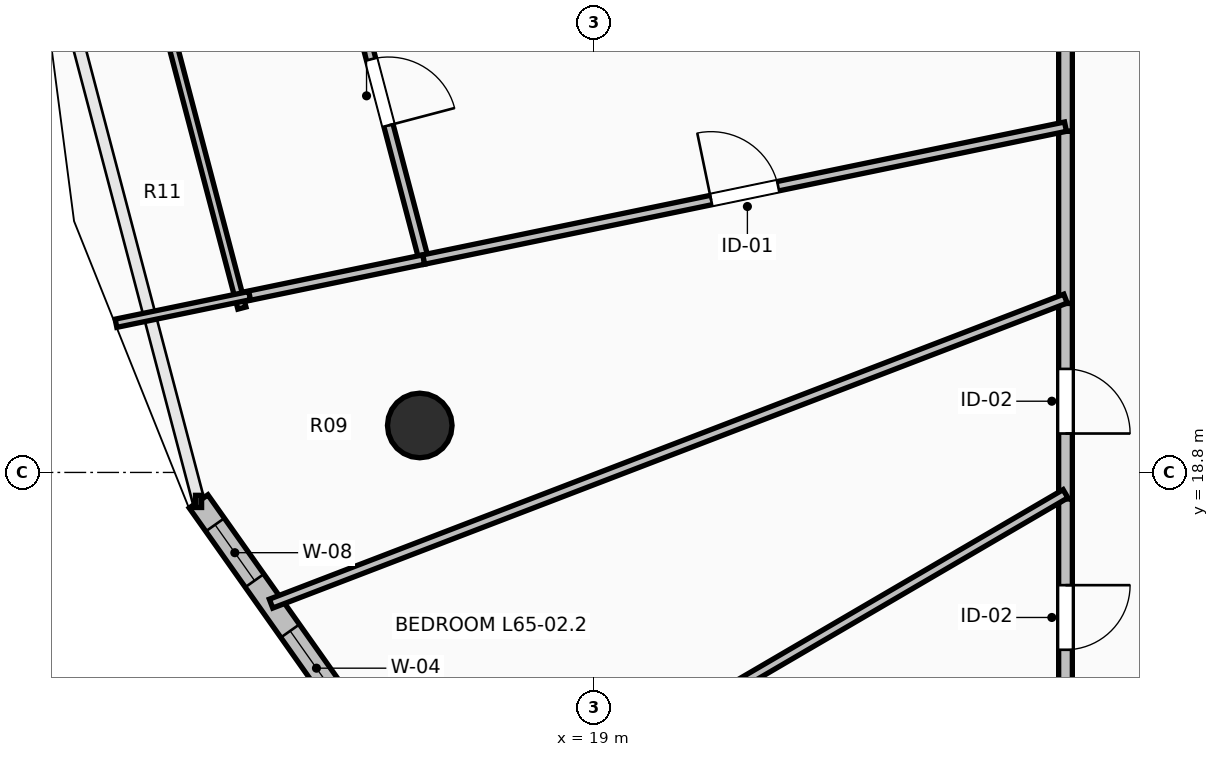
"""IFC4 building model, lengths in metres.
Left out: names, types, materials, properties, quantities, classifications, styles, units other than length and angle.
Written with IfcOpenShell. Run it as: python <this file> out.ifc"""

import sys

from ifc_helpers import new_model, si_unit, direction, frame, frame_2d, origin, origin_2d, place, context, subcontext, project, spatial, rectangle, circle, extrude, element, fill, save


model = new_model("IFC4")
c1 = context("Model", 3, precision=1e-05, world=origin(), true_north=direction((0.0, 1.0)))
c2 = subcontext(c1, "Body", "Model", "MODEL_VIEW")
j1 = project(units=[si_unit("LENGTHUNIT", "METRE"), si_unit("PLANEANGLEUNIT", "RADIAN")], contexts=[c1])
p1 = place(None, origin())
s1 = spatial("IfcSite", under=j1, at=p1, CompositionType="ELEMENT")
p2 = place(p1, origin())
s2 = spatial("IfcBuilding", under=s1, at=p2, CompositionType="ELEMENT")
p3 = place(p2, frame((0.0, 0.0, 241.35)))
s3 = spatial("IfcBuildingStorey", under=s2, at=p3, CompositionType="ELEMENT", Elevation=241.35)
p4 = place(p3, frame((16.705, 19.418, 0.0), z_axis=(0.0, 0.0, 1.0), x_axis=(-0.923879532511, -0.382683432365, 0.0)))
e1 = element("IfcColumn", 1, at=p4, inside=s3, PredefinedType="COLUMN", context=c2, shape_type="SweptSolid", body=[
    extrude(circle(Radius=0.425, at=origin_2d()), origin(), (0.0, 0.0, 1.0), 3.55),
])
p5 = place(p3, frame((13.794, 18.419, 0.0), z_axis=(0.0, 0.0, 1.0), x_axis=(0.577261247247, -0.816559521668, 0.0)))
e2 = element("IfcWall", 2, at=p5, inside=s3, PredefinedType="STANDARD", context=c2, shape_type="SweptSolid", body=[
    extrude(rectangle(XDim=4.194, YDim=0.3, at=frame_2d((2.097, 0.0))), origin(), (0.0, 0.0, 1.0), 3.29),
])
p6 = place(p5, frame((0.376, 0.0, 0.85)))
e3 = element("IfcOpeningElement", 3, at=p6, cuts=e2, PredefinedType="OPENING", context=c2, shape_type="SweptSolid", body=[
    extrude(rectangle(XDim=0.9, YDim=1.8, at=frame_2d((0.45, 0.9))), frame((0.0, 0.165, 0.0), z_axis=(0.0, -1.0, 0.0), x_axis=(1.0, 0.0, 0.0)), (0.0, 0.0, 1.0), 0.33),
])
p7 = place(p5, frame((2.087, 0.0, 0.85)))
e4 = element("IfcOpeningElement", 4, at=p7, cuts=e2, PredefinedType="OPENING", context=c2, shape_type="SweptSolid", body=[
    extrude(rectangle(XDim=1.2, YDim=1.95, at=frame_2d((0.6, 0.975))), frame((0.0, 0.165, 0.0), z_axis=(0.0, -1.0, 0.0), x_axis=(1.0, 0.0, 0.0)), (0.0, 0.0, 1.0), 0.33),
])
p8 = place(p3, frame((25.2, 27.735, 0.0), z_axis=(0.0, 0.0, 1.0), x_axis=(0.0, -1.0, 0.0)))
e5 = element("IfcWall", 5, at=p8, inside=s3, PredefinedType="PARTITIONING", context=c2, shape_type="SweptSolid", body=[
    extrude(rectangle(XDim=4.447, YDim=0.18, at=frame_2d((2.224, 0.0))), origin(), (0.0, 0.0, 1.0), 2.482),
])
p9 = place(p8, frame((1.723, 0.0, 0.0)))
e6 = element("IfcOpeningElement", 6, at=p9, cuts=e5, PredefinedType="OPENING", context=c2, shape_type="SweptSolid", body=[
    extrude(rectangle(XDim=1.0, YDim=2.15, at=frame_2d((0.5, 1.075))), frame((0.0, 0.105, 0.0), z_axis=(0.0, -1.0, 0.0), x_axis=(1.0, 0.0, 0.0)), (0.0, 0.0, 1.0), 0.21),
])
p10 = place(p3, frame((25.2, 23.288, 0.0), z_axis=(0.0, 0.0, 1.0), x_axis=(0.0, -1.0, 0.0)))
e7 = element("IfcWall", 7, at=p10, inside=s3, PredefinedType="PARTITIONING", context=c2, shape_type="SweptSolid", body=[
    extrude(rectangle(XDim=2.265, YDim=0.18, at=frame_2d((1.133, 0.0))), origin(), (0.0, 0.0, 1.0), 3.29),
])
p11 = place(p3, frame((25.2, 21.023, 0.0), z_axis=(0.0, 0.0, 1.0), x_axis=(0.0, -1.0, 0.0)))
e8 = element("IfcWall", 8, at=p11, inside=s3, PredefinedType="PARTITIONING", context=c2, shape_type="SweptSolid", body=[
    extrude(rectangle(XDim=2.572, YDim=0.18, at=frame_2d((1.286, 0.0))), origin(), (0.0, 0.0, 1.0), 3.29),
])
p12 = place(p11, frame((0.861, 0.0, 0.0)))
e9 = element("IfcOpeningElement", 9, at=p12, cuts=e8, PredefinedType="OPENING", context=c2, shape_type="SweptSolid", body=[
    extrude(rectangle(XDim=0.85, YDim=2.1, at=frame_2d((0.425, 1.05))), frame((0.0, 0.105, 0.0), z_axis=(0.0, -1.0, 0.0), x_axis=(1.0, 0.0, 0.0)), (0.0, 0.0, 1.0), 0.21),
])
p13 = place(p3, frame((25.2, 18.451, 0.0), z_axis=(0.0, 0.0, 1.0), x_axis=(0.0, -1.0, 0.0)))
e10 = element("IfcWall", 10, at=p13, inside=s3, PredefinedType="PARTITIONING", context=c2, shape_type="SweptSolid", body=[
    extrude(rectangle(XDim=3.118, YDim=0.18, at=frame_2d((1.559, 0.0))), origin(), (0.0, 0.0, 1.0), 2.482),
])
p14 = place(p13, frame((1.134, 0.0, 0.0)))
e11 = element("IfcOpeningElement", 11, at=p14, cuts=e10, PredefinedType="OPENING", context=c2, shape_type="SweptSolid", body=[
    extrude(rectangle(XDim=0.85, YDim=2.1, at=frame_2d((0.425, 1.05))), frame((0.0, 0.105, 0.0), z_axis=(0.0, -1.0, 0.0), x_axis=(1.0, 0.0, 0.0)), (0.0, 0.0, 1.0), 0.21),
])
p15 = place(p3, frame((15.6, 26.0, 0.0), z_axis=(0.0, 0.0, 1.0), x_axis=(0.25436383836, -0.967108596661, 0.0)))
e12 = element("IfcWall", 12, at=p15, inside=s3, PredefinedType="PARTITIONING", context=c2, shape_type="SweptSolid", body=[
    extrude(rectangle(XDim=4.549, YDim=0.125, at=frame_2d((2.274, 0.0))), origin(), (0.0, 0.0, 1.0), 2.482),
])
p16 = place(p15, frame((1.824, 0.0, 0.0)))
e13 = element("IfcOpeningElement", 13, at=p16, cuts=e12, PredefinedType="OPENING", context=c2, shape_type="SweptSolid", body=[
    extrude(rectangle(XDim=0.9, YDim=2.1, at=frame_2d((0.45, 1.05))), frame((0.0, 0.077, 0.0), z_axis=(0.0, -1.0, 0.0), x_axis=(1.0, 0.0, 0.0)), (0.0, 0.0, 1.0), 0.155),
])
p17 = place(p3, frame((16.757, 21.601, 0.0), z_axis=(0.0, 0.0, 1.0), x_axis=(-0.979193678003, -0.2029279206, 0.0)))
e14 = element("IfcWall", 14, at=p17, inside=s3, PredefinedType="PARTITIONING", context=c2, shape_type="SweptSolid", body=[
    extrude(rectangle(XDim=2.479, YDim=0.125, at=frame_2d((1.24, 0.0))), origin(), (0.0, 0.0, 1.0), 2.874),
])
p18 = place(p3, frame((16.757, 21.601, 0.0), z_axis=(0.0, 0.0, 1.0), x_axis=(0.979226116247, 0.20277133244, 0.0)))
e15 = element("IfcWall", 15, at=p18, inside=s3, PredefinedType="PARTITIONING", context=c2, shape_type="SweptSolid", body=[
    extrude(rectangle(XDim=8.622, YDim=0.125, at=frame_2d((4.311, 0.0))), origin(), (0.0, 0.0, 1.0), 2.924),
])
p19 = place(p18, frame((3.861, 0.0, 0.0)))
e16 = element("IfcOpeningElement", 16, at=p19, cuts=e15, PredefinedType="OPENING", context=c2, shape_type="SweptSolid", body=[
    extrude(rectangle(XDim=0.9, YDim=2.1, at=frame_2d((0.45, 1.05))), frame((0.0, 0.077, 0.0), z_axis=(0.0, -1.0, 0.0), x_axis=(1.0, 0.0, 0.0)), (0.0, 0.0, 1.0), 0.155),
])
p20 = place(p3, frame((14.365, 20.963, 0.0), z_axis=(0.0, 0.0, 1.0), x_axis=(-0.254288836667, 0.967128320104, 0.0)))
e17 = element("IfcWall", 17, at=p20, inside=s3, PredefinedType="PARTITIONING", context=c2, shape_type="SweptSolid", body=[
    extrude(rectangle(XDim=5.349, YDim=0.11, at=frame_2d((2.674, 0.0))), origin(), (0.0, 0.0, 1.0), 3.29),
])
p21 = place(p3, frame((12.708, 20.763, 0.0), z_axis=(0.0, 0.0, 1.0), x_axis=(0.979256697864, 0.202623591143, 0.0)))
e18 = element("IfcWall", 18, at=p21, inside=s3, PredefinedType="PARTITIONING", context=c2, shape_type="SweptSolid", body=[
    extrude(rectangle(XDim=1.795, YDim=0.11, at=frame_2d((0.898, 0.0))), origin(), (0.0, 0.0, 1.0), 3.29),
])
p22 = place(p3, frame((14.748, 17.074, 0.0), z_axis=(0.0, 0.0, 1.0), x_axis=(0.93355564233, 0.358432507836, 0.0)))
e19 = element("IfcWall", 19, at=p22, inside=s3, PredefinedType="PARTITIONING", context=c2, shape_type="SweptSolid", body=[
    extrude(rectangle(XDim=11.196, YDim=0.125, at=frame_2d((5.598, 0.0))), origin(), (0.0, 0.0, 1.0), 2.482),
])
p23 = place(p3, frame((17.363, 13.941, 0.0), z_axis=(0.0, 0.0, 1.0), x_axis=(0.863415767124, 0.5044930258, 0.0)))
e20 = element("IfcWall", 20, at=p23, inside=s3, PredefinedType="PARTITIONING", context=c2, shape_type="SweptSolid", body=[
    extrude(rectangle(XDim=9.077, YDim=0.125, at=frame_2d((4.538, 0.0))), origin(), (0.0, 0.0, 1.0), 2.482),
])
p24 = place(p6, origin())
e21 = element("IfcWindow", 21, at=p24, inside=s3, PartitioningType="SINGLE_PANEL", PredefinedType="WINDOW", context=c2, shape_type="SweptSolid", body=[
    extrude(rectangle(XDim=0.9, YDim=1.8, at=frame_2d((0.45, 0.9))), frame((0.0, 0.03, 0.0), z_axis=(0.0, -1.0, 0.0), x_axis=(1.0, 0.0, 0.0)), (0.0, 0.0, 1.0), 0.06),
])
fill(e3, e21)
p25 = place(p7, origin())
e22 = element("IfcWindow", 22, at=p25, inside=s3, PartitioningType="SINGLE_PANEL", PredefinedType="WINDOW", context=c2, shape_type="SweptSolid", body=[
    extrude(rectangle(XDim=1.2, YDim=1.95, at=frame_2d((0.6, 0.975))), frame((0.0, 0.03, 0.0), z_axis=(0.0, -1.0, 0.0), x_axis=(1.0, 0.0, 0.0)), (0.0, 0.0, 1.0), 0.06),
])
fill(e4, e22)
p26 = place(p16, origin())
e23 = element("IfcDoor", 23, at=p26, inside=s3, OperationType="SINGLE_SWING_RIGHT", PredefinedType="DOOR", context=c2, shape_type="SweptSolid", body=[
    extrude(rectangle(XDim=0.9, YDim=2.1, at=frame_2d((0.45, 1.05))), frame((0.0, 0.025, 0.0), z_axis=(0.0, -1.0, 0.0), x_axis=(1.0, 0.0, 0.0)), (0.0, 0.0, 1.0), 0.05),
])
fill(e13, e23)
p27 = place(p19, origin())
e24 = element("IfcDoor", 24, at=p27, inside=s3, OperationType="SINGLE_SWING_LEFT", PredefinedType="DOOR", context=c2, shape_type="SweptSolid", body=[
    extrude(rectangle(XDim=0.9, YDim=2.1, at=frame_2d((0.45, 1.05))), frame((0.0, 0.025, 0.0), z_axis=(0.0, -1.0, 0.0), x_axis=(1.0, 0.0, 0.0)), (0.0, 0.0, 1.0), 0.05),
])
fill(e16, e24)
p28 = place(p12, origin())
e25 = element("IfcDoor", 25, at=p28, inside=s3, OperationType="SINGLE_SWING_RIGHT", PredefinedType="DOOR", context=c2, shape_type="SweptSolid", body=[
    extrude(rectangle(XDim=0.85, YDim=2.1, at=frame_2d((0.425, 1.05))), frame((0.0, 0.025, 0.0), z_axis=(0.0, -1.0, 0.0), x_axis=(1.0, 0.0, 0.0)), (0.0, 0.0, 1.0), 0.05),
])
fill(e9, e25)
p29 = place(p14, origin())
e26 = element("IfcDoor", 26, at=p29, inside=s3, OperationType="SINGLE_SWING_LEFT", PredefinedType="DOOR", context=c2, shape_type="SweptSolid", body=[
    extrude(rectangle(XDim=0.85, YDim=2.1, at=frame_2d((0.425, 1.05))), frame((0.0, 0.025, 0.0), z_axis=(0.0, -1.0, 0.0), x_axis=(1.0, 0.0, 0.0)), (0.0, 0.0, 1.0), 0.05),
])
fill(e11, e26)
save(model, sys.argv[1])
